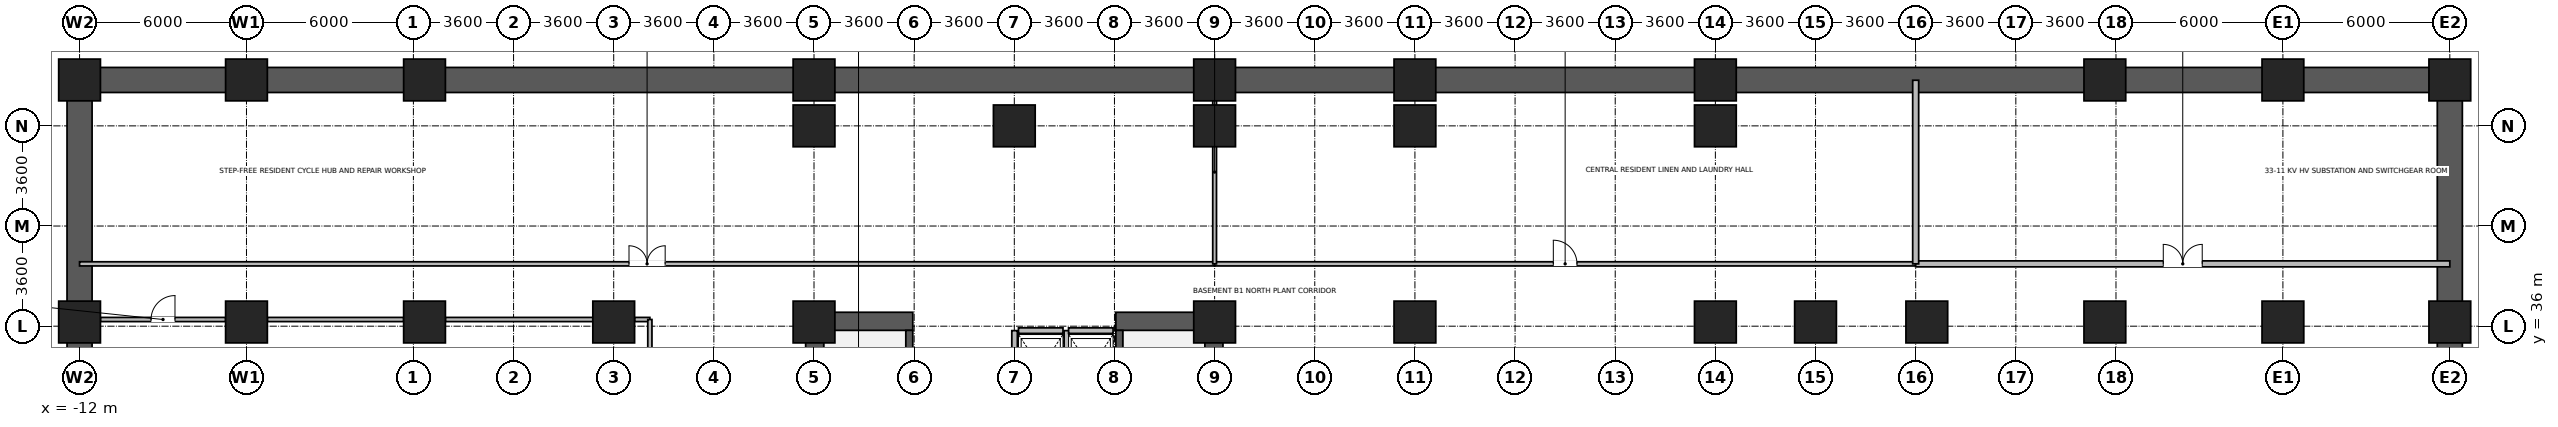
"""IFC4 building model, lengths in metres.
Left out: names, types, materials, properties, quantities, classifications, styles, units other than length and angle.
Written with IfcOpenShell. Run it as: python <this file> out.ifc"""

import sys

from ifc_helpers import new_model, si_unit, direction, frame, frame_2d, origin, origin_2d, place, context, subcontext, project, spatial, rectangle, extrude, source, transform, mapped, element, fill, save


model = new_model("IFC4")
c1 = context("Model", 3, precision=1e-05, world=origin(), true_north=direction((0.0, 1.0)))
c2 = subcontext(c1, "Body", "Model", "MODEL_VIEW")
j1 = project(units=[si_unit("LENGTHUNIT", "METRE"), si_unit("PLANEANGLEUNIT", "RADIAN")], contexts=[c1])
p1 = place(None, origin())
s1 = spatial("IfcSite", under=j1, at=p1, CompositionType="ELEMENT")
p2 = place(p1, origin())
s2 = spatial("IfcBuilding", under=s1, at=p2, CompositionType="ELEMENT")
p3 = place(p2, frame((0.0, 0.0, -4.5)))
s3 = spatial("IfcBuildingStorey", under=s2, at=p3, CompositionType="ELEMENT", Elevation=-4.5)
p4 = place(p3, frame((-12.45, 44.85, 0.0), z_axis=(0.0, 0.0, 1.0), x_axis=(1.0, 0.0, 0.0)))
e1 = element("IfcWall", 1, at=p4, inside=s3, PredefinedType="USERDEFINED", context=c2, shape_type="SweptSolid", body=[
    extrude(rectangle(XDim=86.1, YDim=0.9, at=frame_2d((43.05, 0.0))), origin(), (0.0, 0.0, 1.0), 4.15),
])
for number, where, z_axis, x_axis in (
    (2, (-12.0, 2.25, 0.0), (0.0, 0.0, 1.0), (0.0, 1.0, 0.0)),
    (3, (73.2, 2.25, 0.0), (0.0, 0.0, 1.0), (0.0, 1.0, 0.0)),
):
    element("IfcWall", number, at=place(p3, frame(where, z_axis=z_axis, x_axis=x_axis)), inside=s3, PredefinedType="USERDEFINED", context=c2, shape_type="SweptSolid", body=[
        extrude(rectangle(XDim=42.15, YDim=0.9, at=frame_2d((21.075, 0.0))), origin(), (0.0, 0.0, 1.0), 4.15),
    ])
for number, where, z_axis, x_axis in (
    (4, (14.425, 28.2, 0.0), (0.0, 0.0, 1.0), (0.0, 1.0, 0.0)),
    (5, (28.775, 28.2, 0.0), (0.0, 0.0, 1.0), (0.0, 1.0, 0.0)),
):
    element("IfcWall", number, at=place(p3, frame(where, z_axis=z_axis, x_axis=x_axis)), inside=s3, PredefinedType="SHEAR", context=c2, shape_type="SweptSolid", body=[
        extrude(rectangle(XDim=8.3, YDim=0.65, at=frame_2d((4.15, 0.0))), origin(), (0.0, 0.0, 1.0), 4.15),
    ])
for number, where, z_axis, x_axis in (
    (6, (14.75, 36.175, 0.0), (0.0, 0.0, 1.0), (1.0, 0.0, 0.0)),
    (7, (25.25, 36.175, 0.0), (0.0, 0.0, 1.0), (1.0, 0.0, 0.0)),
):
    element("IfcWall", number, at=place(p3, frame(where, z_axis=z_axis, x_axis=x_axis)), inside=s3, PredefinedType="SHEAR", context=c2, shape_type="SweptSolid", body=[
        extrude(rectangle(XDim=3.2, YDim=0.65, at=frame_2d((1.6, 0.0))), origin(), (0.0, 0.0, 1.0), 4.15),
    ])
p5 = place(p3, frame((17.825, 28.85, 0.0), z_axis=(0.0, 0.0, 1.0), x_axis=(0.0, 1.0, 0.0)))
e8 = element("IfcWall", 8, at=p5, inside=s3, PredefinedType="SHEAR", context=c2, shape_type="SweptSolid", body=[
    extrude(rectangle(XDim=7.0, YDim=0.25, at=frame_2d((3.5, 0.0))), origin(), (0.0, 0.0, 1.0), 4.15),
])
p6 = place(p5, frame((0.15, 0.0, 0.0)))
e9 = element("IfcOpeningElement", 9, at=p6, cuts=e8, PredefinedType="OPENING", context=c2, shape_type="SweptSolid", body=[
    extrude(rectangle(XDim=1.1, YDim=2.08, at=frame_2d((0.55, 1.04))), frame((0.0, 0.135, 0.0), z_axis=(0.0, -1.0, 0.0), x_axis=(1.0, 0.0, 0.0)), (0.0, 0.0, 1.0), 0.27),
])
p7 = place(p3, frame((25.375, 28.85, 0.0), z_axis=(0.0, 0.0, 1.0), x_axis=(0.0, 1.0, 0.0)))
e10 = element("IfcWall", 10, at=p7, inside=s3, PredefinedType="SHEAR", context=c2, shape_type="SweptSolid", body=[
    extrude(rectangle(XDim=7.0, YDim=0.25, at=frame_2d((3.5, 0.0))), origin(), (0.0, 0.0, 1.0), 4.15),
])
p8 = place(p7, frame((0.15, 0.0, 0.0)))
e11 = element("IfcOpeningElement", 11, at=p8, cuts=e10, PredefinedType="OPENING", context=c2, shape_type="SweptSolid", body=[
    extrude(rectangle(XDim=1.1, YDim=2.08, at=frame_2d((0.55, 1.04))), frame((0.0, 0.135, 0.0), z_axis=(0.0, -1.0, 0.0), x_axis=(1.0, 0.0, 0.0)), (0.0, 0.0, 1.0), 0.27),
])
m1 = source(origin(), c2, "Body", "SweptSolid", [
    extrude(rectangle(XDim=1.5, YDim=1.5, at=origin_2d()), origin(), (0.0, 0.0, 1.0), 4.5),
])
for number, where, z_axis, x_axis in (
    (12, (7.2, 36.15, 0.0), (0.0, 0.0, 1.0), (1.0, 0.0, 0.0)),
    (13, (14.4, 36.15, 0.0), (0.0, 0.0, 1.0), (1.0, 0.0, 0.0)),
    (14, (14.4, 43.2, 0.0), (0.0, 0.0, 1.0), (1.0, 0.0, 0.0)),
    (15, (21.6, 43.2, 0.0), (0.0, 0.0, 1.0), (1.0, 0.0, 0.0)),
    (16, (28.8, 36.15, 0.0), (0.0, 0.0, 1.0), (1.0, 0.0, 0.0)),
    (17, (28.8, 43.2, 0.0), (0.0, 0.0, 1.0), (1.0, 0.0, 0.0)),
    (18, (36.0, 43.2, 0.0), (0.0, 0.0, 1.0), (1.0, 0.0, 0.0)),
    (19, (36.0, 36.15, 0.0), (0.0, 0.0, 1.0), (1.0, 0.0, 0.0)),
    (20, (46.8, 36.15, 0.0), (0.0, 0.0, 1.0), (1.0, 0.0, 0.0)),
    (21, (46.8, 43.2, 0.0), (0.0, 0.0, 1.0), (1.0, 0.0, 0.0)),
    (22, (50.4, 36.15, 0.0), (0.0, 0.0, 1.0), (1.0, 0.0, 0.0)),
    (23, (54.4, 36.15, 0.0), (0.0, 0.0, 1.0), (1.0, 0.0, 0.0)),
    (24, (0.4, 36.15, 0.0), (0.0, 0.0, 1.0), (1.0, 0.0, 0.0)),
    (25, (0.4, 44.85, 0.0), (0.0, 0.0, 1.0), (1.0, 0.0, 0.0)),
    (26, (14.4, 44.85, 0.0), (0.0, 0.0, 1.0), (1.0, 0.0, 0.0)),
    (27, (28.8, 44.85, 0.0), (0.0, 0.0, 1.0), (1.0, 0.0, 0.0)),
    (28, (36.0, 44.85, 0.0), (0.0, 0.0, 1.0), (1.0, 0.0, 0.0)),
    (29, (46.8, 44.85, 0.0), (0.0, 0.0, 1.0), (1.0, 0.0, 0.0)),
    (30, (60.8, 44.85, 0.0), (0.0, 0.0, 1.0), (1.0, 0.0, 0.0)),
    (31, (60.8, 36.15, 0.0), (0.0, 0.0, 1.0), (1.0, 0.0, 0.0)),
    (32, (-12.0, 36.15, 0.0), (0.0, 0.0, 1.0), (1.0, 0.0, 0.0)),
    (33, (-12.0, 44.85, 0.0), (0.0, 0.0, 1.0), (1.0, 0.0, 0.0)),
    (34, (-6.0, 36.15, 0.0), (0.0, 0.0, 1.0), (1.0, 0.0, 0.0)),
    (35, (-6.0, 44.85, 0.0), (0.0, 0.0, 1.0), (1.0, 0.0, 0.0)),
    (36, (67.2, 36.15, 0.0), (0.0, 0.0, 1.0), (1.0, 0.0, 0.0)),
    (37, (67.2, 44.85, 0.0), (0.0, 0.0, 1.0), (1.0, 0.0, 0.0)),
    (38, (73.2, 36.15, 0.0), (0.0, 0.0, 1.0), (1.0, 0.0, 0.0)),
    (39, (73.2, 44.85, 0.0), (0.0, 0.0, 1.0), (1.0, 0.0, 0.0)),
):
    element("IfcColumn", number, at=place(p3, frame(where, z_axis=z_axis, x_axis=x_axis)), inside=s3, PredefinedType="COLUMN", context=c2, shape_type="MappedRepresentation", body=[
        mapped(m1, transform((0.0, 0.0, 0.0), x_axis=(1.0, 0.0, 0.0), y_axis=(0.0, 1.0, 0.0), z_axis=(0.0, 0.0, 1.0), scale=1.0)),
    ])
p9 = place(p3, frame((21.75, 35.84, 0.0), z_axis=(0.0, 0.0, 1.0), x_axis=(1.0, 0.0, 0.0)))
e40 = element("IfcWall", 40, at=p9, inside=s3, PredefinedType="PARTITIONING", context=c2, shape_type="SweptSolid", body=[
    extrude(rectangle(XDim=1.6, YDim=0.2, at=frame_2d((0.8, 0.0))), origin(), (0.0, 0.0, 1.0), 2.93),
])
for number, where, z_axis, x_axis in (
    (41, (21.61, 33.16, 0.0), (0.0, 0.0, 1.0), (0.0, 1.0, 0.0)),
    (42, (23.49, 33.16, 0.0), (0.0, 0.0, 1.0), (0.0, 1.0, 0.0)),
):
    element("IfcWall", number, at=place(p3, frame(where, z_axis=z_axis, x_axis=x_axis)), inside=s3, PredefinedType="PARTITIONING", context=c2, shape_type="SweptSolid", body=[
        extrude(rectangle(XDim=2.68, YDim=0.2, at=frame_2d((1.34, 0.0))), origin(), (0.0, 0.0, 1.0), 4.13),
    ])
p10 = place(p3, frame((23.55, 35.84, 0.0), z_axis=(0.0, 0.0, 1.0), x_axis=(1.0, 0.0, 0.0)))
e43 = element("IfcWall", 43, at=p10, inside=s3, PredefinedType="PARTITIONING", context=c2, shape_type="SweptSolid", body=[
    extrude(rectangle(XDim=1.6, YDim=0.2, at=frame_2d((0.8, 0.0))), origin(), (0.0, 0.0, 1.0), 2.93),
])
p11 = place(p3, frame((-12.0, 38.24, 0.0), z_axis=(0.0, 0.0, 1.0), x_axis=(1.0, 0.0, 0.0)))
e44 = element("IfcWall", 44, at=p11, inside=s3, PredefinedType="PARTITIONING", context=c2, shape_type="SweptSolid", body=[
    extrude(rectangle(XDim=40.8, YDim=0.15, at=frame_2d((20.4, 0.0))), origin(), (0.0, 0.0, 1.0), 4.13),
])
p12 = place(p11, frame((19.75, 0.0, 0.0)))
e45 = element("IfcOpeningElement", 45, at=p12, cuts=e44, PredefinedType="OPENING", context=c2, shape_type="SweptSolid", body=[
    extrude(rectangle(XDim=1.3, YDim=2.12, at=frame_2d((0.65, 1.06))), frame((0.0, 0.085, 0.0), z_axis=(0.0, -1.0, 0.0), x_axis=(1.0, 0.0, 0.0)), (0.0, 0.0, 1.0), 0.17),
])
p13 = place(p3, frame((28.8, 38.24, 0.0), z_axis=(0.0, 0.0, 1.0), x_axis=(1.0, 0.0, 0.0)))
e46 = element("IfcWall", 46, at=p13, inside=s3, PredefinedType="PARTITIONING", context=c2, shape_type="SweptSolid", body=[
    extrude(rectangle(XDim=25.2, YDim=0.15, at=frame_2d((12.6, 0.0))), origin(), (0.0, 0.0, 1.0), 4.13),
])
p14 = place(p13, frame((12.175, 0.0, 0.0)))
e47 = element("IfcOpeningElement", 47, at=p14, cuts=e46, PredefinedType="OPENING", context=c2, shape_type="SweptSolid", body=[
    extrude(rectangle(XDim=0.85, YDim=2.04, at=frame_2d((0.425, 1.02))), frame((0.0, 0.085, 0.0), z_axis=(0.0, -1.0, 0.0), x_axis=(1.0, 0.0, 0.0)), (0.0, 0.0, 1.0), 0.17),
])
p15 = place(p3, frame((-11.25, 36.24, 0.0), z_axis=(0.0, 0.0, 1.0), x_axis=(1.0, 0.0, 0.0)))
e48 = element("IfcWall", 48, at=p15, inside=s3, PredefinedType="PARTITIONING", context=c2, shape_type="SweptSolid", body=[
    extrude(rectangle(XDim=4.5, YDim=0.15, at=frame_2d((2.25, 0.0))), origin(), (0.0, 0.0, 1.0), 3.43),
])
p16 = place(p15, frame((1.82, 0.0, 0.0)))
e49 = element("IfcOpeningElement", 49, at=p16, cuts=e48, PredefinedType="OPENING", context=c2, shape_type="SweptSolid", body=[
    extrude(rectangle(XDim=0.86, YDim=2.02, at=frame_2d((0.43, 1.01))), frame((0.0, 0.085, 0.0), z_axis=(0.0, -1.0, 0.0), x_axis=(1.0, 0.0, 0.0)), (0.0, 0.0, 1.0), 0.17),
])
p17 = place(p3, frame((-5.25, 36.24, 0.0), z_axis=(0.0, 0.0, 1.0), x_axis=(1.0, 0.0, 0.0)))
e50 = element("IfcWall", 50, at=p17, inside=s3, PredefinedType="PARTITIONING", context=c2, shape_type="SweptSolid", body=[
    extrude(rectangle(XDim=4.9, YDim=0.15, at=frame_2d((2.45, 0.0))), origin(), (0.0, 0.0, 1.0), 3.43),
])
p18 = place(p3, frame((1.15, 36.24, 0.0), z_axis=(0.0, 0.0, 1.0), x_axis=(1.0, 0.0, 0.0)))
e51 = element("IfcWall", 51, at=p18, inside=s3, PredefinedType="PARTITIONING", context=c2, shape_type="SweptSolid", body=[
    extrude(rectangle(XDim=5.3, YDim=0.15, at=frame_2d((2.65, 0.0))), origin(), (0.0, 0.0, 1.0), 3.43),
])
p19 = place(p3, frame((7.95, 36.24, 0.0), z_axis=(0.0, 0.0, 1.0), x_axis=(1.0, 0.0, 0.0)))
e52 = element("IfcWall", 52, at=p19, inside=s3, PredefinedType="PARTITIONING", context=c2, shape_type="SweptSolid", body=[
    extrude(rectangle(XDim=0.55, YDim=0.15, at=frame_2d((0.275, 0.0))), origin(), (0.0, 0.0, 1.0), 3.43),
])
p20 = place(p3, frame((54.0, 38.24, 0.0), z_axis=(0.0, 0.0, 1.0), x_axis=(1.0, 0.0, 0.0)))
e53 = element("IfcWall", 53, at=p20, inside=s3, PredefinedType="PARTITIONING", context=c2, shape_type="SweptSolid", body=[
    extrude(rectangle(XDim=19.2, YDim=0.215, at=frame_2d((9.6, 0.0))), origin(), (0.0, 0.0, 1.0), 4.13),
])
p21 = place(p20, frame((8.9, 0.0, 0.0)))
e54 = element("IfcOpeningElement", 54, at=p21, cuts=e53, PredefinedType="OPENING", context=c2, shape_type="SweptSolid", body=[
    extrude(rectangle(XDim=1.4, YDim=2.15, at=frame_2d((0.7, 1.075))), frame((0.0, 0.118, 0.0), z_axis=(0.0, -1.0, 0.0), x_axis=(1.0, 0.0, 0.0)), (0.0, 0.0, 1.0), 0.235),
])
p22 = place(p3, frame((8.5, 28.56, 0.0), z_axis=(0.0, 0.0, 1.0), x_axis=(0.0, 1.0, 0.0)))
e55 = element("IfcWall", 55, at=p22, inside=s3, PredefinedType="PARTITIONING", context=c2, shape_type="SweptSolid", body=[
    extrude(rectangle(XDim=7.68, YDim=0.15, at=frame_2d((3.84, 0.0))), origin(), (0.0, 0.0, 1.0), 4.13),
])
p23 = place(p3, frame((28.8, 38.24, 0.0), z_axis=(0.0, 0.0, 1.0), x_axis=(0.0, 1.0, 0.0)))
e56 = element("IfcWall", 56, at=p23, inside=s3, PredefinedType="PARTITIONING", context=c2, shape_type="SweptSolid", body=[
    extrude(rectangle(XDim=6.6, YDim=0.135, at=frame_2d((3.3, 0.0))), origin(), (0.0, 0.0, 1.0), 3.53),
])
p24 = place(p3, frame((54.0, 38.24, 0.0), z_axis=(0.0, 0.0, 1.0), x_axis=(0.0, 1.0, 0.0)))
e57 = element("IfcWall", 57, at=p24, inside=s3, PredefinedType="PARTITIONING", context=c2, shape_type="SweptSolid", body=[
    extrude(rectangle(XDim=6.6, YDim=0.215, at=frame_2d((3.3, 0.0))), origin(), (0.0, 0.0, 1.0), 4.13),
])
p25 = place(p12, origin())
e58 = element("IfcDoor", 58, at=p25, inside=s3, OperationType="DOUBLE_DOOR_SINGLE_SWING", PredefinedType="DOOR", context=c2, shape_type="SweptSolid", body=[
    extrude(rectangle(XDim=1.3, YDim=2.12, at=frame_2d((0.65, 1.06))), frame((0.0, 0.025, 0.0), z_axis=(0.0, -1.0, 0.0), x_axis=(1.0, 0.0, 0.0)), (0.0, 0.0, 1.0), 0.05),
])
fill(e45, e58)
p26 = place(p14, origin())
e59 = element("IfcDoor", 59, at=p26, inside=s3, OperationType="SINGLE_SWING_LEFT", PredefinedType="DOOR", context=c2, shape_type="SweptSolid", body=[
    extrude(rectangle(XDim=0.85, YDim=2.04, at=frame_2d((0.425, 1.02))), frame((0.0, 0.025, 0.0), z_axis=(0.0, -1.0, 0.0), x_axis=(1.0, 0.0, 0.0)), (0.0, 0.0, 1.0), 0.05),
])
fill(e47, e59)
p27 = place(p16, origin())
e60 = element("IfcDoor", 60, at=p27, inside=s3, OperationType="SINGLE_SWING_RIGHT", PredefinedType="DOOR", context=c2, shape_type="SweptSolid", body=[
    extrude(rectangle(XDim=0.86, YDim=2.02, at=frame_2d((0.43, 1.01))), frame((0.0, 0.025, 0.0), z_axis=(0.0, -1.0, 0.0), x_axis=(1.0, 0.0, 0.0)), (0.0, 0.0, 1.0), 0.05),
])
fill(e49, e60)
p28 = place(p21, origin())
e61 = element("IfcDoor", 61, at=p28, inside=s3, OperationType="DOUBLE_DOOR_SINGLE_SWING", PredefinedType="DOOR", context=c2, shape_type="SweptSolid", body=[
    extrude(rectangle(XDim=1.4, YDim=2.15, at=frame_2d((0.7, 1.075))), frame((0.0, 0.025, 0.0), z_axis=(0.0, -1.0, 0.0), x_axis=(1.0, 0.0, 0.0)), (0.0, 0.0, 1.0), 0.05),
])
fill(e54, e61)
save(model, sys.argv[1])
